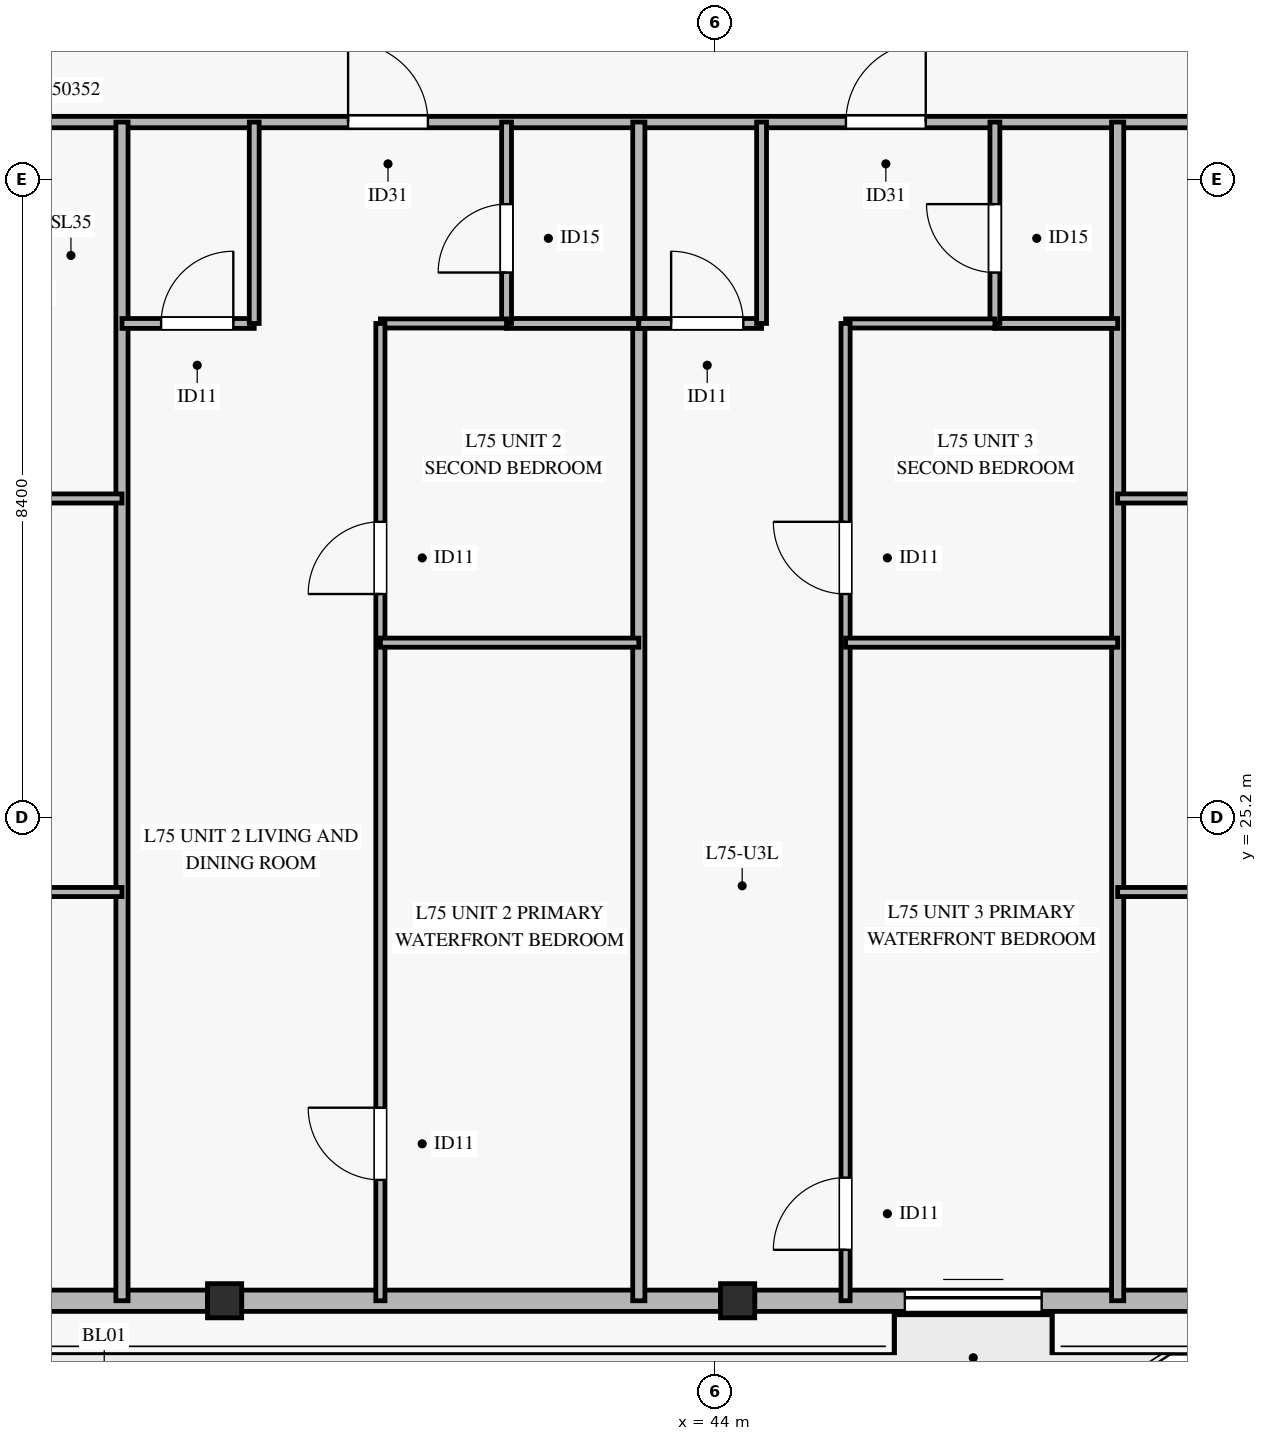
"""IFC4 building model, lengths in metres.
Left out: names, types, materials, properties, quantities, classifications, styles, units other than length and angle.
Written with IfcOpenShell. Run it as: python <this file> out.ifc"""

import sys

from ifc_helpers import new_model, si_unit, direction, frame, frame_2d, origin, origin_2d, place, context, subcontext, project, spatial, rectangle, hollow_rectangle, extrude, source, transform, mapped, element, fill, save


model = new_model("IFC4")
c1 = context("Model", 3, precision=1e-05, world=origin(), true_north=direction((0.0, 1.0)))
c2 = subcontext(c1, "Body", "Model", "MODEL_VIEW")
j1 = project(units=[si_unit("LENGTHUNIT", "METRE"), si_unit("PLANEANGLEUNIT", "RADIAN")], contexts=[c1])
p1 = place(None, origin())
s1 = spatial("IfcSite", under=j1, at=p1, CompositionType="ELEMENT")
p2 = place(p1, origin())
s2 = spatial("IfcBuilding", under=s1, at=p2, CompositionType="ELEMENT")
p3 = place(p2, frame((0.0, 0.0, 293.8)))
s3 = spatial("IfcBuildingStorey", under=s2, at=p3, CompositionType="ELEMENT", Elevation=293.8)
m1 = source(origin(), c2, "Body", "SweptSolid", [
    extrude(hollow_rectangle(XDim=0.45, YDim=0.45, WallThickness=0.022, at=origin_2d()), origin(), (0.0, 0.0, 1.0), 3.185),
])
for number, where, z_axis, x_axis in (
    (1, (37.55, 18.841, 0.0), (0.0, 0.0, 1.0), (1.0, 0.0, 0.0)),
    (2, (44.3, 18.841, 0.0), (0.0, 0.0, 1.0), (1.0, 0.0, 0.0)),
):
    element("IfcColumn", number, at=place(p3, frame(where, z_axis=z_axis, x_axis=x_axis)), inside=s3, PredefinedType="COLUMN", context=c2, shape_type="MappedRepresentation", body=[
        mapped(m1, transform((0.0, 0.0, 0.0), x_axis=(1.0, 0.0, 0.0), y_axis=(0.0, 1.0, 0.0), z_axis=(0.0, 0.0, 1.0), scale=1.0)),
    ])
for number, where, z_axis, x_axis in (
    (3, (31.025, 18.841, 0.0), (0.0, 0.0, 1.0), (1.0, 0.0, 0.0)),
    (4, (37.775, 18.841, 0.0), (0.0, 0.0, 1.0), (1.0, 0.0, 0.0)),
):
    element("IfcWall", number, at=place(p3, frame(where, z_axis=z_axis, x_axis=x_axis)), inside=s3, PredefinedType="SOLIDWALL", context=c2, shape_type="SweptSolid", body=[
        extrude(rectangle(XDim=6.3, YDim=0.28, at=frame_2d((3.15, 0.0))), origin(), (0.0, 0.0, 1.0), 2.815),
    ])
p4 = place(p3, frame((44.525, 18.841, 0.0), z_axis=(0.0, 0.0, 1.0), x_axis=(1.0, 0.0, 0.0)))
e5 = element("IfcWall", 5, at=p4, inside=s3, PredefinedType="SOLIDWALL", context=c2, shape_type="SweptSolid", body=[
    extrude(rectangle(XDim=5.8, YDim=0.28, at=frame_2d((2.9, 0.0))), origin(), (0.0, 0.0, 1.0), 2.815),
])
p5 = place(p4, frame((1.975, 0.0, 0.0)))
e6 = element("IfcOpeningElement", 6, at=p5, cuts=e5, PredefinedType="OPENING", context=c2, shape_type="SweptSolid", body=[
    extrude(rectangle(XDim=1.8, YDim=2.25, at=frame_2d((0.9, 1.125))), frame((0.0, 0.15, 0.0), z_axis=(0.0, -1.0, 0.0), x_axis=(1.0, 0.0, 0.0)), (0.0, 0.0, 1.0), 0.3),
])
p6 = place(p3, frame((10.024, 34.35, 0.0), z_axis=(0.0, 0.0, 1.0), x_axis=(1.0, 0.0, 0.0)))
e7 = element("IfcWall", 7, at=p6, inside=s3, PredefinedType="PARTITIONING", context=c2, shape_type="SweptSolid", body=[
    extrude(rectangle(XDim=50.352, YDim=0.15, at=frame_2d((25.176, 0.0))), origin(), (0.0, 0.0, 1.0), 2.47),
])
p7 = place(p6, frame((5.148, 0.0, 0.0)))
e8 = element("IfcOpeningElement", 8, at=p7, cuts=e7, PredefinedType="OPENING", context=c2, shape_type="SweptSolid", body=[
    extrude(rectangle(XDim=1.05, YDim=2.15, at=frame_2d((0.525, 1.075))), frame((0.0, 0.085, 0.0), z_axis=(0.0, -1.0, 0.0), x_axis=(1.0, 0.0, 0.0)), (0.0, 0.0, 1.0), 0.17),
])
p8 = place(p6, frame((15.651, 0.0, 0.0)))
e9 = element("IfcOpeningElement", 9, at=p8, cuts=e7, PredefinedType="OPENING", context=c2, shape_type="SweptSolid", body=[
    extrude(rectangle(XDim=1.05, YDim=2.15, at=frame_2d((0.525, 1.075))), frame((0.0, 0.085, 0.0), z_axis=(0.0, -1.0, 0.0), x_axis=(1.0, 0.0, 0.0)), (0.0, 0.0, 1.0), 0.17),
])
p9 = place(p6, frame((22.129, 0.0, 0.0)))
e10 = element("IfcOpeningElement", 10, at=p9, cuts=e7, PredefinedType="OPENING", context=c2, shape_type="SweptSolid", body=[
    extrude(rectangle(XDim=1.05, YDim=2.15, at=frame_2d((0.525, 1.075))), frame((0.0, 0.085, 0.0), z_axis=(0.0, -1.0, 0.0), x_axis=(1.0, 0.0, 0.0)), (0.0, 0.0, 1.0), 0.17),
])
p10 = place(p6, frame((29.151, 0.0, 0.0)))
e11 = element("IfcOpeningElement", 11, at=p10, cuts=e7, PredefinedType="OPENING", context=c2, shape_type="SweptSolid", body=[
    extrude(rectangle(XDim=1.05, YDim=2.15, at=frame_2d((0.525, 1.075))), frame((0.0, 0.085, 0.0), z_axis=(0.0, -1.0, 0.0), x_axis=(1.0, 0.0, 0.0)), (0.0, 0.0, 1.0), 0.17),
])
p11 = place(p6, frame((35.701, 0.0, 0.0)))
e12 = element("IfcOpeningElement", 12, at=p11, cuts=e7, PredefinedType="OPENING", context=c2, shape_type="SweptSolid", body=[
    extrude(rectangle(XDim=1.05, YDim=2.15, at=frame_2d((0.525, 1.075))), frame((0.0, 0.085, 0.0), z_axis=(0.0, -1.0, 0.0), x_axis=(1.0, 0.0, 0.0)), (0.0, 0.0, 1.0), 0.17),
])
p12 = place(p6, frame((43.578, 0.0, 0.0)))
e13 = element("IfcOpeningElement", 13, at=p12, cuts=e7, PredefinedType="OPENING", context=c2, shape_type="SweptSolid", body=[
    extrude(rectangle(XDim=1.05, YDim=2.15, at=frame_2d((0.525, 1.075))), frame((0.0, 0.085, 0.0), z_axis=(0.0, -1.0, 0.0), x_axis=(1.0, 0.0, 0.0)), (0.0, 0.0, 1.0), 0.17),
])
for number, where, z_axis, x_axis in (
    (14, (36.2, 18.841, 0.0), (0.0, 0.0, 1.0), (0.0, 1.0, 0.0)),
    (15, (43.0, 18.841, 0.0), (0.0, 0.0, 1.0), (0.0, 1.0, 0.0)),
    (16, (49.3, 18.841, 0.0), (0.0, 0.0, 1.0), (0.0, 1.0, 0.0)),
):
    element("IfcWall", number, at=place(p3, frame(where, z_axis=z_axis, x_axis=x_axis)), inside=s3, PredefinedType="PARTITIONING", context=c2, shape_type="SweptSolid", body=[
        extrude(rectangle(XDim=15.509, YDim=0.16, at=frame_2d((7.754, 0.0))), origin(), (0.0, 0.0, 1.0), 2.77),
    ])
p13 = place(p3, frame((29.4, 24.219, 0.0), z_axis=(0.0, 0.0, 1.0), x_axis=(1.0, 0.0, 0.0)))
e17 = element("IfcWall", 17, at=p13, inside=s3, PredefinedType="PARTITIONING", context=c2, shape_type="SweptSolid", body=[
    extrude(rectangle(XDim=6.8, YDim=0.12, at=frame_2d((3.4, 0.0))), origin(), (0.0, 0.0, 1.0), 2.47),
])
p14 = place(p13, frame((2.886, 0.0, 0.0)))
e18 = element("IfcOpeningElement", 18, at=p14, cuts=e17, PredefinedType="OPENING", context=c2, shape_type="SweptSolid", body=[
    extrude(rectangle(XDim=0.95, YDim=2.1, at=frame_2d((0.475, 1.05))), frame((0.0, 0.07, 0.0), z_axis=(0.0, -1.0, 0.0), x_axis=(1.0, 0.0, 0.0)), (0.0, 0.0, 1.0), 0.14),
])
p15 = place(p3, frame((29.4, 29.397, 0.0), z_axis=(0.0, 0.0, 1.0), x_axis=(1.0, 0.0, 0.0)))
e19 = element("IfcWall", 19, at=p15, inside=s3, PredefinedType="PARTITIONING", context=c2, shape_type="SweptSolid", body=[
    extrude(rectangle(XDim=6.8, YDim=0.12, at=frame_2d((3.4, 0.0))), origin(), (0.0, 0.0, 1.0), 2.47),
])
p16 = place(p15, frame((2.886, 0.0, 0.0)))
e20 = element("IfcOpeningElement", 20, at=p16, cuts=e19, PredefinedType="OPENING", context=c2, shape_type="SweptSolid", body=[
    extrude(rectangle(XDim=0.95, YDim=2.1, at=frame_2d((0.475, 1.05))), frame((0.0, 0.07, 0.0), z_axis=(0.0, -1.0, 0.0), x_axis=(1.0, 0.0, 0.0)), (0.0, 0.0, 1.0), 0.14),
])
p17 = place(p3, frame((36.2, 31.7, 0.0), z_axis=(0.0, 0.0, 1.0), x_axis=(1.0, 0.0, 0.0)))
e21 = element("IfcWall", 21, at=p17, inside=s3, PredefinedType="PARTITIONING", context=c2, shape_type="SweptSolid", body=[
    extrude(rectangle(XDim=1.74, YDim=0.13, at=frame_2d((0.87, 0.0))), origin(), (0.0, 0.0, 1.0), 2.47),
])
p18 = place(p17, frame((0.515, 0.0, 0.0)))
e22 = element("IfcOpeningElement", 22, at=p18, cuts=e21, PredefinedType="OPENING", context=c2, shape_type="SweptSolid", body=[
    extrude(rectangle(XDim=0.95, YDim=2.1, at=frame_2d((0.475, 1.05))), frame((0.0, 0.075, 0.0), z_axis=(0.0, -1.0, 0.0), x_axis=(1.0, 0.0, 0.0)), (0.0, 0.0, 1.0), 0.15),
])
p19 = place(p3, frame((37.94, 31.7, 0.0), z_axis=(0.0, 0.0, 1.0), x_axis=(0.0, 1.0, 0.0)))
e23 = element("IfcWall", 23, at=p19, inside=s3, PredefinedType="PARTITIONING", context=c2, shape_type="SweptSolid", body=[
    extrude(rectangle(XDim=2.65, YDim=0.13, at=frame_2d((1.325, 0.0))), origin(), (0.0, 0.0, 1.0), 2.77),
])
p20 = place(p3, frame((41.26, 31.7, 0.0), z_axis=(0.0, 0.0, 1.0), x_axis=(1.0, 0.0, 0.0)))
e24 = element("IfcWall", 24, at=p20, inside=s3, PredefinedType="PARTITIONING", context=c2, shape_type="SweptSolid", body=[
    extrude(rectangle(XDim=1.74, YDim=0.13, at=frame_2d((0.87, 0.0))), origin(), (0.0, 0.0, 1.0), 3.185),
])
p21 = place(p3, frame((41.26, 31.7, 0.0), z_axis=(0.0, 0.0, 1.0), x_axis=(0.0, 1.0, 0.0)))
e25 = element("IfcWall", 25, at=p21, inside=s3, PredefinedType="PARTITIONING", context=c2, shape_type="SweptSolid", body=[
    extrude(rectangle(XDim=2.65, YDim=0.13, at=frame_2d((1.325, 0.0))), origin(), (0.0, 0.0, 1.0), 2.77),
])
p22 = place(p21, frame((0.67, 0.0, 0.0)))
e26 = element("IfcOpeningElement", 26, at=p22, cuts=e25, PredefinedType="OPENING", context=c2, shape_type="SweptSolid", body=[
    extrude(rectangle(XDim=0.9, YDim=2.1, at=frame_2d((0.45, 1.05))), frame((0.0, 0.075, 0.0), z_axis=(0.0, -1.0, 0.0), x_axis=(1.0, 0.0, 0.0)), (0.0, 0.0, 1.0), 0.15),
])
p23 = place(p3, frame((39.6, 31.7, 0.0), z_axis=(0.0, 0.0, 1.0), x_axis=(1.0, 0.0, 0.0)))
e27 = element("IfcWall", 27, at=p23, inside=s3, PredefinedType="PARTITIONING", context=c2, shape_type="SweptSolid", body=[
    extrude(rectangle(XDim=1.66, YDim=0.12, at=frame_2d((0.83, 0.0))), origin(), (0.0, 0.0, 1.0), 3.185),
])
p24 = place(p3, frame((39.6, 18.841, 0.0), z_axis=(0.0, 0.0, 1.0), x_axis=(0.0, 1.0, 0.0)))
e28 = element("IfcWall", 28, at=p24, inside=s3, PredefinedType="PARTITIONING", context=c2, shape_type="SweptSolid", body=[
    extrude(rectangle(XDim=12.859, YDim=0.12, at=frame_2d((6.429, 0.0))), origin(), (0.0, 0.0, 1.0), 2.77),
])
p25 = place(p24, frame((1.59, 0.0, 0.0)))
e29 = element("IfcOpeningElement", 29, at=p25, cuts=e28, PredefinedType="OPENING", context=c2, shape_type="SweptSolid", body=[
    extrude(rectangle(XDim=0.95, YDim=2.1, at=frame_2d((0.475, 1.05))), frame((0.0, 0.07, 0.0), z_axis=(0.0, -1.0, 0.0), x_axis=(1.0, 0.0, 0.0)), (0.0, 0.0, 1.0), 0.14),
])
p26 = place(p24, frame((9.299, 0.0, 0.0)))
e30 = element("IfcOpeningElement", 30, at=p26, cuts=e28, PredefinedType="OPENING", context=c2, shape_type="SweptSolid", body=[
    extrude(rectangle(XDim=0.95, YDim=2.1, at=frame_2d((0.475, 1.05))), frame((0.0, 0.07, 0.0), z_axis=(0.0, -1.0, 0.0), x_axis=(1.0, 0.0, 0.0)), (0.0, 0.0, 1.0), 0.14),
])
p27 = place(p3, frame((39.6, 27.5, 0.0), z_axis=(0.0, 0.0, 1.0), x_axis=(1.0, 0.0, 0.0)))
e31 = element("IfcWall", 31, at=p27, inside=s3, PredefinedType="PARTITIONING", context=c2, shape_type="SweptSolid", body=[
    extrude(rectangle(XDim=3.4, YDim=0.12, at=frame_2d((1.7, 0.0))), origin(), (0.0, 0.0, 1.0), 3.185),
])
p28 = place(p3, frame((43.0, 31.7, 0.0), z_axis=(0.0, 0.0, 1.0), x_axis=(1.0, 0.0, 0.0)))
e32 = element("IfcWall", 32, at=p28, inside=s3, PredefinedType="PARTITIONING", context=c2, shape_type="SweptSolid", body=[
    extrude(rectangle(XDim=1.615, YDim=0.13, at=frame_2d((0.808, 0.0))), origin(), (0.0, 0.0, 1.0), 2.47),
])
p29 = place(p28, frame((0.425, 0.0, 0.0)))
e33 = element("IfcOpeningElement", 33, at=p29, cuts=e32, PredefinedType="OPENING", context=c2, shape_type="SweptSolid", body=[
    extrude(rectangle(XDim=0.95, YDim=2.1, at=frame_2d((0.475, 1.05))), frame((0.0, 0.075, 0.0), z_axis=(0.0, -1.0, 0.0), x_axis=(1.0, 0.0, 0.0)), (0.0, 0.0, 1.0), 0.15),
])
p30 = place(p3, frame((44.615, 31.7, 0.0), z_axis=(0.0, 0.0, 1.0), x_axis=(0.0, 1.0, 0.0)))
e34 = element("IfcWall", 34, at=p30, inside=s3, PredefinedType="PARTITIONING", context=c2, shape_type="SweptSolid", body=[
    extrude(rectangle(XDim=2.65, YDim=0.13, at=frame_2d((1.325, 0.0))), origin(), (0.0, 0.0, 1.0), 2.77),
])
p31 = place(p3, frame((47.685, 31.7, 0.0), z_axis=(0.0, 0.0, 1.0), x_axis=(1.0, 0.0, 0.0)))
e35 = element("IfcWall", 35, at=p31, inside=s3, PredefinedType="PARTITIONING", context=c2, shape_type="SweptSolid", body=[
    extrude(rectangle(XDim=1.615, YDim=0.13, at=frame_2d((0.808, 0.0))), origin(), (0.0, 0.0, 1.0), 3.185),
])
p32 = place(p3, frame((47.685, 31.7, 0.0), z_axis=(0.0, 0.0, 1.0), x_axis=(0.0, 1.0, 0.0)))
e36 = element("IfcWall", 36, at=p32, inside=s3, PredefinedType="PARTITIONING", context=c2, shape_type="SweptSolid", body=[
    extrude(rectangle(XDim=2.65, YDim=0.13, at=frame_2d((1.325, 0.0))), origin(), (0.0, 0.0, 1.0), 2.77),
])
p33 = place(p32, frame((0.67, 0.0, 0.0)))
e37 = element("IfcOpeningElement", 37, at=p33, cuts=e36, PredefinedType="OPENING", context=c2, shape_type="SweptSolid", body=[
    extrude(rectangle(XDim=0.9, YDim=2.1, at=frame_2d((0.45, 1.05))), frame((0.0, 0.075, 0.0), z_axis=(0.0, -1.0, 0.0), x_axis=(1.0, 0.0, 0.0)), (0.0, 0.0, 1.0), 0.15),
])
p34 = place(p3, frame((45.72, 31.7, 0.0), z_axis=(0.0, 0.0, 1.0), x_axis=(1.0, 0.0, 0.0)))
e38 = element("IfcWall", 38, at=p34, inside=s3, PredefinedType="PARTITIONING", context=c2, shape_type="SweptSolid", body=[
    extrude(rectangle(XDim=1.965, YDim=0.12, at=frame_2d((0.982, 0.0))), origin(), (0.0, 0.0, 1.0), 3.185),
])
p35 = place(p3, frame((45.72, 18.841, 0.0), z_axis=(0.0, 0.0, 1.0), x_axis=(0.0, 1.0, 0.0)))
e39 = element("IfcWall", 39, at=p35, inside=s3, PredefinedType="PARTITIONING", context=c2, shape_type="SweptSolid", body=[
    extrude(rectangle(XDim=12.859, YDim=0.12, at=frame_2d((6.429, 0.0))), origin(), (0.0, 0.0, 1.0), 2.77),
])
p36 = place(p35, frame((0.67, 0.0, 0.0)))
e40 = element("IfcOpeningElement", 40, at=p36, cuts=e39, PredefinedType="OPENING", context=c2, shape_type="SweptSolid", body=[
    extrude(rectangle(XDim=0.95, YDim=2.1, at=frame_2d((0.475, 1.05))), frame((0.0, 0.07, 0.0), z_axis=(0.0, -1.0, 0.0), x_axis=(1.0, 0.0, 0.0)), (0.0, 0.0, 1.0), 0.14),
])
p37 = place(p35, frame((9.299, 0.0, 0.0)))
e41 = element("IfcOpeningElement", 41, at=p37, cuts=e39, PredefinedType="OPENING", context=c2, shape_type="SweptSolid", body=[
    extrude(rectangle(XDim=0.95, YDim=2.1, at=frame_2d((0.475, 1.05))), frame((0.0, 0.07, 0.0), z_axis=(0.0, -1.0, 0.0), x_axis=(1.0, 0.0, 0.0)), (0.0, 0.0, 1.0), 0.14),
])
p38 = place(p3, frame((45.72, 27.5, 0.0), z_axis=(0.0, 0.0, 1.0), x_axis=(1.0, 0.0, 0.0)))
e42 = element("IfcWall", 42, at=p38, inside=s3, PredefinedType="PARTITIONING", context=c2, shape_type="SweptSolid", body=[
    extrude(rectangle(XDim=3.58, YDim=0.12, at=frame_2d((1.79, 0.0))), origin(), (0.0, 0.0, 1.0), 3.185),
])
p39 = place(p3, frame((49.3, 24.219, 0.0), z_axis=(0.0, 0.0, 1.0), x_axis=(1.0, 0.0, 0.0)))
e43 = element("IfcWall", 43, at=p39, inside=s3, PredefinedType="PARTITIONING", context=c2, shape_type="SweptSolid", body=[
    extrude(rectangle(XDim=11.076, YDim=0.12, at=frame_2d((5.538, 0.0))), origin(), (0.0, 0.0, 1.0), 2.47),
])
p40 = place(p39, frame((4.516, 0.0, 0.0)))
e44 = element("IfcOpeningElement", 44, at=p40, cuts=e43, PredefinedType="OPENING", context=c2, shape_type="SweptSolid", body=[
    extrude(rectangle(XDim=0.95, YDim=2.1, at=frame_2d((0.475, 1.05))), frame((0.0, 0.07, 0.0), z_axis=(0.0, -1.0, 0.0), x_axis=(1.0, 0.0, 0.0)), (0.0, 0.0, 1.0), 0.14),
])
p41 = place(p3, frame((49.3, 29.397, 0.0), z_axis=(0.0, 0.0, 1.0), x_axis=(1.0, 0.0, 0.0)))
e45 = element("IfcWall", 45, at=p41, inside=s3, PredefinedType="PARTITIONING", context=c2, shape_type="SweptSolid", body=[
    extrude(rectangle(XDim=11.076, YDim=0.12, at=frame_2d((5.538, 0.0))), origin(), (0.0, 0.0, 1.0), 2.47),
])
p42 = place(p41, frame((4.516, 0.0, 0.0)))
e46 = element("IfcOpeningElement", 46, at=p42, cuts=e45, PredefinedType="OPENING", context=c2, shape_type="SweptSolid", body=[
    extrude(rectangle(XDim=0.95, YDim=2.1, at=frame_2d((0.475, 1.05))), frame((0.0, 0.07, 0.0), z_axis=(0.0, -1.0, 0.0), x_axis=(1.0, 0.0, 0.0)), (0.0, 0.0, 1.0), 0.14),
])
m2 = source(origin(), c2, "Body", "SweptSolid", [
    extrude(rectangle(XDim=1.8, YDim=2.25, at=frame_2d((0.9, 1.125))), frame((0.0, 0.025, 0.0), z_axis=(0.0, -1.0, 0.0), x_axis=(1.0, 0.0, 0.0)), (0.0, 0.0, 1.0), 0.05),
])
p43 = place(p5, origin())
e47 = element("IfcDoor", 47, at=p43, inside=s3, OperationType="SLIDING_TO_LEFT", PredefinedType="DOOR", context=c2, shape_type="MappedRepresentation", body=[
    mapped(m2, transform((0.0, 0.0, 0.0), x_axis=(1.0, 0.0, 0.0), y_axis=(0.0, 1.0, 0.0), z_axis=(0.0, 0.0, 1.0), scale=1.0)),
])
fill(e6, e47)
m3 = source(origin(), c2, "Body", "SweptSolid", [
    extrude(rectangle(XDim=1.05, YDim=2.15, at=frame_2d((0.525, 1.075))), frame((0.0, 0.025, 0.0), z_axis=(0.0, -1.0, 0.0), x_axis=(1.0, 0.0, 0.0)), (0.0, 0.0, 1.0), 0.05),
])
p44 = place(p10, origin())
e48 = element("IfcDoor", 48, at=p44, inside=s3, OperationType="SINGLE_SWING_LEFT", PredefinedType="DOOR", context=c2, shape_type="MappedRepresentation", body=[
    mapped(m3, transform((0.0, 0.0, 0.0), x_axis=(1.0, 0.0, 0.0), y_axis=(0.0, 1.0, 0.0), z_axis=(0.0, 0.0, 1.0), scale=1.0)),
])
fill(e11, e48)
m4 = source(origin(), c2, "Body", "SweptSolid", [
    extrude(rectangle(XDim=0.95, YDim=2.1, at=frame_2d((0.475, 1.05))), frame((0.0, 0.025, 0.0), z_axis=(0.0, -1.0, 0.0), x_axis=(1.0, 0.0, 0.0)), (0.0, 0.0, 1.0), 0.05),
])
p45 = place(p18, origin())
e49 = element("IfcDoor", 49, at=p45, inside=s3, OperationType="SINGLE_SWING_RIGHT", PredefinedType="DOOR", context=c2, shape_type="MappedRepresentation", body=[
    mapped(m4, transform((0.0, 0.0, 0.0), x_axis=(1.0, 0.0, 0.0), y_axis=(0.0, 1.0, 0.0), z_axis=(0.0, 0.0, 1.0), scale=1.0)),
])
fill(e22, e49)
m5 = source(origin(), c2, "Body", "SweptSolid", [
    extrude(rectangle(XDim=0.9, YDim=2.1, at=frame_2d((0.45, 1.05))), frame((0.0, 0.025, 0.0), z_axis=(0.0, -1.0, 0.0), x_axis=(1.0, 0.0, 0.0)), (0.0, 0.0, 1.0), 0.05),
])
p46 = place(p22, origin())
e50 = element("IfcDoor", 50, at=p46, inside=s3, OperationType="SINGLE_SWING_LEFT", PredefinedType="DOOR", context=c2, shape_type="MappedRepresentation", body=[
    mapped(m5, transform((0.0, 0.0, 0.0), x_axis=(1.0, 0.0, 0.0), y_axis=(0.0, 1.0, 0.0), z_axis=(0.0, 0.0, 1.0), scale=1.0)),
])
fill(e26, e50)
p47 = place(p25, origin())
e51 = element("IfcDoor", 51, at=p47, inside=s3, OperationType="SINGLE_SWING_RIGHT", PredefinedType="DOOR", context=c2, shape_type="MappedRepresentation", body=[
    mapped(m4, transform((0.0, 0.0, 0.0), x_axis=(1.0, 0.0, 0.0), y_axis=(0.0, 1.0, 0.0), z_axis=(0.0, 0.0, 1.0), scale=1.0)),
])
fill(e29, e51)
p48 = place(p26, origin())
e52 = element("IfcDoor", 52, at=p48, inside=s3, OperationType="SINGLE_SWING_LEFT", PredefinedType="DOOR", context=c2, shape_type="MappedRepresentation", body=[
    mapped(m4, transform((0.0, 0.0, 0.0), x_axis=(1.0, 0.0, 0.0), y_axis=(0.0, 1.0, 0.0), z_axis=(0.0, 0.0, 1.0), scale=1.0)),
])
fill(e30, e52)
p49 = place(p11, origin())
e53 = element("IfcDoor", 53, at=p49, inside=s3, OperationType="SINGLE_SWING_RIGHT", PredefinedType="DOOR", context=c2, shape_type="MappedRepresentation", body=[
    mapped(m3, transform((0.0, 0.0, 0.0), x_axis=(1.0, 0.0, 0.0), y_axis=(0.0, 1.0, 0.0), z_axis=(0.0, 0.0, 1.0), scale=1.0)),
])
fill(e12, e53)
p50 = place(p29, origin())
e54 = element("IfcDoor", 54, at=p50, inside=s3, OperationType="SINGLE_SWING_LEFT", PredefinedType="DOOR", context=c2, shape_type="MappedRepresentation", body=[
    mapped(m4, transform((0.0, 0.0, 0.0), x_axis=(1.0, 0.0, 0.0), y_axis=(0.0, 1.0, 0.0), z_axis=(0.0, 0.0, 1.0), scale=1.0)),
])
fill(e33, e54)
p51 = place(p33, origin())
e55 = element("IfcDoor", 55, at=p51, inside=s3, OperationType="SINGLE_SWING_RIGHT", PredefinedType="DOOR", context=c2, shape_type="MappedRepresentation", body=[
    mapped(m5, transform((0.0, 0.0, 0.0), x_axis=(1.0, 0.0, 0.0), y_axis=(0.0, 1.0, 0.0), z_axis=(0.0, 0.0, 1.0), scale=1.0)),
])
fill(e37, e55)
p52 = place(p36, origin())
e56 = element("IfcDoor", 56, at=p52, inside=s3, OperationType="SINGLE_SWING_LEFT", PredefinedType="DOOR", context=c2, shape_type="MappedRepresentation", body=[
    mapped(m4, transform((0.0, 0.0, 0.0), x_axis=(1.0, 0.0, 0.0), y_axis=(0.0, 1.0, 0.0), z_axis=(0.0, 0.0, 1.0), scale=1.0)),
])
fill(e40, e56)
p53 = place(p37, origin())
e57 = element("IfcDoor", 57, at=p53, inside=s3, OperationType="SINGLE_SWING_RIGHT", PredefinedType="DOOR", context=c2, shape_type="MappedRepresentation", body=[
    mapped(m4, transform((0.0, 0.0, 0.0), x_axis=(1.0, 0.0, 0.0), y_axis=(0.0, 1.0, 0.0), z_axis=(0.0, 0.0, 1.0), scale=1.0)),
])
fill(e41, e57)
save(model, sys.argv[1])
